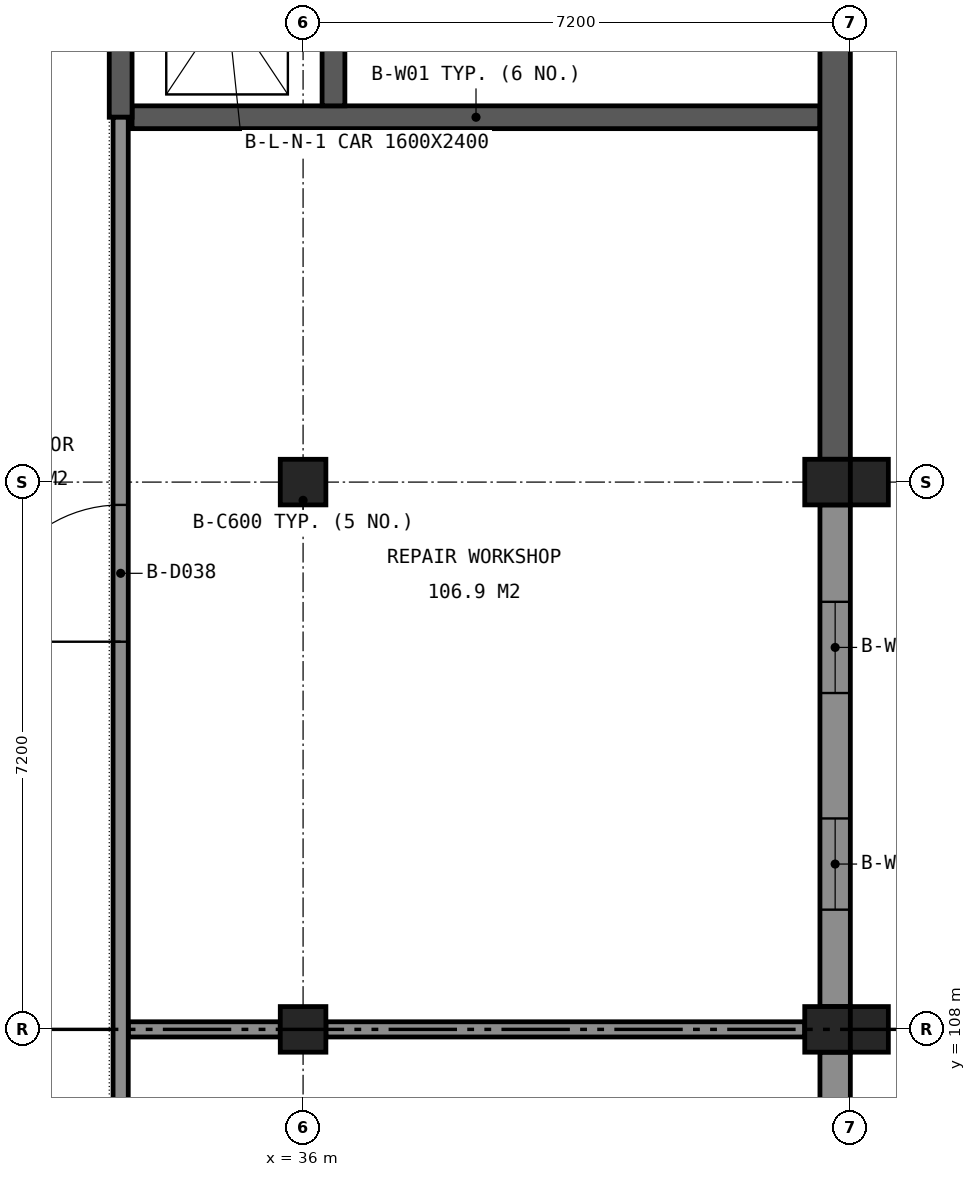
"""IFC4 building model, lengths in metres.
Left out: names, types, materials, properties, quantities, classifications, styles, units other than length and angle.
Written with IfcOpenShell. Run it as: python <this file> out.ifc"""

import sys

from ifc_helpers import new_model, si_unit, direction, frame, frame_2d, origin, origin_2d, place, context, subcontext, project, spatial, rectangle, extrude, element, fill, save


model = new_model("IFC4")
c1 = context("Model", 3, precision=1e-05, world=origin(), true_north=direction((0.0, 1.0)))
c2 = subcontext(c1, "Body", "Model", "MODEL_VIEW")
j1 = project(units=[si_unit("LENGTHUNIT", "METRE"), si_unit("PLANEANGLEUNIT", "RADIAN")], contexts=[c1])
p1 = place(None, origin())
s1 = spatial("IfcSite", under=j1, at=p1, CompositionType="ELEMENT")
p2 = place(p1, origin())
s2 = spatial("IfcBuilding", under=s1, at=p2, CompositionType="ELEMENT")
p3 = place(p2, frame((0.0, 0.0, 4.8)))
s3 = spatial("IfcBuildingStorey", under=s2, at=p3, CompositionType="ELEMENT", Elevation=4.8)
for number, where, z_axis, x_axis in (
    (1, (36.0, 115.2, 0.0), (0.0, 0.0, 1.0), (1.0, 0.0, 0.0)),
    (2, (36.0, 108.0, 0.0), (0.0, 0.0, 1.0), (1.0, 0.0, 0.0)),
    (3, (42.9, 115.2, 0.0), (0.0, 0.0, 1.0), (1.0, 0.0, 0.0)),
    (4, (42.9, 108.0, 0.0), (0.0, 0.0, 1.0), (1.0, 0.0, 0.0)),
):
    element("IfcColumn", number, at=place(p3, frame(where, z_axis=z_axis, x_axis=x_axis)), inside=s3, PredefinedType="COLUMN", context=c2, shape_type="SweptSolid", body=[
        extrude(rectangle(XDim=0.6, YDim=0.6, at=origin_2d()), origin(), (0.0, 0.0, 1.0), 4.8),
    ])
p4 = place(p3, frame((33.75, 120.0, 0.0), z_axis=(0.0, 0.0, 1.0), x_axis=(1.0, 0.0, 0.0)))
e5 = element("IfcWall", 5, at=p4, inside=s3, PredefinedType="SHEAR", context=c2, shape_type="SweptSolid", body=[
    extrude(rectangle(XDim=9.05, YDim=0.3, at=frame_2d((4.525, 0.0))), origin(), (0.0, 0.0, 1.0), 4.55),
])
p5 = place(p3, frame((33.6, 120.0, 0.0), z_axis=(0.0, 0.0, 1.0), x_axis=(0.0, 1.0, 0.0)))
e6 = element("IfcWall", 6, at=p5, inside=s3, PredefinedType="SHEAR", context=c2, shape_type="SweptSolid", body=[
    extrude(rectangle(XDim=9.2, YDim=0.3, at=frame_2d((4.6, 0.0))), origin(), (0.0, 0.0, 1.0), 4.55),
])
p6 = place(p5, frame((4.0, 0.0, 0.0)))
e7 = element("IfcOpeningElement", 7, at=p6, cuts=e6, PredefinedType="OPENING", context=c2, shape_type="SweptSolid", body=[
    extrude(rectangle(XDim=1.2, YDim=2.1, at=frame_2d((0.6, 1.05))), frame((0.0, 0.16, 0.0), z_axis=(0.0, -1.0, 0.0), x_axis=(1.0, 0.0, 0.0)), (0.0, 0.0, 1.0), 0.32),
])
p7 = place(p5, frame((7.45, 0.0, 0.0)))
e8 = element("IfcOpeningElement", 8, at=p7, cuts=e6, PredefinedType="OPENING", context=c2, shape_type="SweptSolid", body=[
    extrude(rectangle(XDim=0.9, YDim=2.1, at=frame_2d((0.45, 1.05))), frame((0.0, 0.16, 0.0), z_axis=(0.0, -1.0, 0.0), x_axis=(1.0, 0.0, 0.0)), (0.0, 0.0, 1.0), 0.32),
])
p8 = place(p3, frame((36.4, 120.15, 0.0), z_axis=(0.0, 0.0, 1.0), x_axis=(0.0, 1.0, 0.0)))
e9 = element("IfcWall", 9, at=p8, inside=s3, PredefinedType="SHEAR", context=c2, shape_type="SweptSolid", body=[
    extrude(rectangle(XDim=2.7, YDim=0.3, at=frame_2d((1.35, 0.0))), origin(), (0.0, 0.0, 1.0), 4.55),
])
p9 = place(p3, frame((43.0, 115.5, 0.0), z_axis=(0.0, 0.0, 1.0), x_axis=(0.0, 1.0, 0.0)))
e10 = element("IfcWall", 10, at=p9, inside=s3, PredefinedType="SHEAR", context=c2, shape_type="SweptSolid", body=[
    extrude(rectangle(XDim=14.1, YDim=0.4, at=frame_2d((7.05, 0.0))), origin(), (0.0, 0.0, 1.0), 4.55),
])
p10 = place(p9, frame((12.0, 0.0, 0.0)))
e11 = element("IfcOpeningElement", 11, at=p10, cuts=e10, PredefinedType="OPENING", context=c2, shape_type="SweptSolid", body=[
    extrude(rectangle(XDim=1.2, YDim=2.1, at=frame_2d((0.6, 1.05))), frame((0.0, 0.21, 0.0), z_axis=(0.0, -1.0, 0.0), x_axis=(1.0, 0.0, 0.0)), (0.0, 0.0, 1.0), 0.42),
])
p11 = place(p3, frame((43.0, 101.1, 0.0), z_axis=(0.0, 0.0, 1.0), x_axis=(0.0, 1.0, 0.0)))
e12 = element("IfcWall", 12, at=p11, inside=s3, PredefinedType="SOLIDWALL", context=c2, shape_type="SweptSolid", body=[
    extrude(rectangle(XDim=6.6, YDim=0.4, at=frame_2d((3.3, 0.0))), origin(), (0.0, 0.0, 1.0), 3.95),
])
p12 = place(p11, frame((0.975, 0.0, 0.9)))
e13 = element("IfcOpeningElement", 13, at=p12, cuts=e12, PredefinedType="OPENING", context=c2, shape_type="SweptSolid", body=[
    extrude(rectangle(XDim=1.2, YDim=2.4, at=frame_2d((0.6, 1.2))), frame((0.0, 0.21, 0.0), z_axis=(0.0, -1.0, 0.0), x_axis=(1.0, 0.0, 0.0)), (0.0, 0.0, 1.0), 0.42),
])
p13 = place(p11, frame((4.425, 0.0, 0.9)))
e14 = element("IfcOpeningElement", 14, at=p13, cuts=e12, PredefinedType="OPENING", context=c2, shape_type="SweptSolid", body=[
    extrude(rectangle(XDim=1.2, YDim=2.4, at=frame_2d((0.6, 1.2))), frame((0.0, 0.21, 0.0), z_axis=(0.0, -1.0, 0.0), x_axis=(1.0, 0.0, 0.0)), (0.0, 0.0, 1.0), 0.42),
])
p14 = place(p3, frame((43.0, 108.3, 0.0), z_axis=(0.0, 0.0, 1.0), x_axis=(0.0, 1.0, 0.0)))
e15 = element("IfcWall", 15, at=p14, inside=s3, PredefinedType="SOLIDWALL", context=c2, shape_type="SweptSolid", body=[
    extrude(rectangle(XDim=6.6, YDim=0.4, at=frame_2d((3.3, 0.0))), origin(), (0.0, 0.0, 1.0), 3.95),
])
p15 = place(p14, frame((1.275, 0.0, 0.9)))
e16 = element("IfcOpeningElement", 16, at=p15, cuts=e15, PredefinedType="OPENING", context=c2, shape_type="SweptSolid", body=[
    extrude(rectangle(XDim=1.2, YDim=2.4, at=frame_2d((0.6, 1.2))), frame((0.0, 0.21, 0.0), z_axis=(0.0, -1.0, 0.0), x_axis=(1.0, 0.0, 0.0)), (0.0, 0.0, 1.0), 0.42),
])
p16 = place(p14, frame((4.125, 0.0, 0.9)))
e17 = element("IfcOpeningElement", 17, at=p16, cuts=e15, PredefinedType="OPENING", context=c2, shape_type="SweptSolid", body=[
    extrude(rectangle(XDim=1.2, YDim=2.4, at=frame_2d((0.6, 1.2))), frame((0.0, 0.21, 0.0), z_axis=(0.0, -1.0, 0.0), x_axis=(1.0, 0.0, 0.0)), (0.0, 0.0, 1.0), 0.42),
])
for number, where, z_axis, x_axis in (
    (18, (43.45, 108.0, 0.0), (0.0, 0.0, 1.0), (1.0, 0.0, 0.0)),
    (19, (43.45, 115.2, 0.0), (0.0, 0.0, 1.0), (1.0, 0.0, 0.0)),
):
    element("IfcColumn", number, at=place(p3, frame(where, z_axis=z_axis, x_axis=x_axis)), inside=s3, PredefinedType="COLUMN", context=c2, shape_type="SweptSolid", body=[
        extrude(rectangle(XDim=0.5, YDim=0.6, at=origin_2d()), origin(), (0.0, 0.0, 1.0), 4.8),
    ])
p17 = place(p3, frame((33.7, 108.0, 0.0), z_axis=(0.0, 0.0, 1.0), x_axis=(1.0, 0.0, 0.0)))
e20 = element("IfcWall", 20, at=p17, inside=s3, PredefinedType="PARTITIONING", context=c2, shape_type="SweptSolid", body=[
    extrude(rectangle(XDim=2.0, YDim=0.2, at=frame_2d((1.0, 0.0))), origin(), (0.0, 0.0, 1.0), 3.95),
])
p18 = place(p3, frame((36.3, 108.0, 0.0), z_axis=(0.0, 0.0, 1.0), x_axis=(1.0, 0.0, 0.0)))
e21 = element("IfcWall", 21, at=p18, inside=s3, PredefinedType="PARTITIONING", context=c2, shape_type="SweptSolid", body=[
    extrude(rectangle(XDim=6.3, YDim=0.2, at=frame_2d((3.15, 0.0))), origin(), (0.0, 0.0, 1.0), 3.95),
])
p19 = place(p3, frame((33.6, 96.0, 0.0), z_axis=(0.0, 0.0, 1.0), x_axis=(0.0, 1.0, 0.0)))
e22 = element("IfcWall", 22, at=p19, inside=s3, PredefinedType="PARTITIONING", context=c2, shape_type="SweptSolid", body=[
    extrude(rectangle(XDim=24.0, YDim=0.2, at=frame_2d((12.0, 0.0))), origin(), (0.0, 0.0, 1.0), 3.95),
])
p20 = place(p19, frame((17.1, 0.0, 0.0)))
e23 = element("IfcOpeningElement", 23, at=p20, cuts=e22, PredefinedType="OPENING", context=c2, shape_type="SweptSolid", body=[
    extrude(rectangle(XDim=1.8, YDim=2.1, at=frame_2d((0.9, 1.05))), frame((0.0, 0.11, 0.0), z_axis=(0.0, -1.0, 0.0), x_axis=(1.0, 0.0, 0.0)), (0.0, 0.0, 1.0), 0.22),
])
p21 = place(p19, frame((9.7, 0.0, 0.0)))
e24 = element("IfcOpeningElement", 24, at=p21, cuts=e22, PredefinedType="OPENING", context=c2, shape_type="SweptSolid", body=[
    extrude(rectangle(XDim=1.0, YDim=2.1, at=frame_2d((0.5, 1.05))), frame((0.0, 0.11, 0.0), z_axis=(0.0, -1.0, 0.0), x_axis=(1.0, 0.0, 0.0)), (0.0, 0.0, 1.0), 0.22),
])
p22 = place(p19, frame((3.3, 0.0, 0.0)))
e25 = element("IfcOpeningElement", 25, at=p22, cuts=e22, PredefinedType="OPENING", context=c2, shape_type="SweptSolid", body=[
    extrude(rectangle(XDim=1.8, YDim=2.1, at=frame_2d((0.9, 1.05))), frame((0.0, 0.11, 0.0), z_axis=(0.0, -1.0, 0.0), x_axis=(1.0, 0.0, 0.0)), (0.0, 0.0, 1.0), 0.22),
])
p23 = place(p15, origin())
e26 = element("IfcWindow", 26, at=p23, inside=s3, PartitioningType="SINGLE_PANEL", PredefinedType="WINDOW", context=c2, shape_type="SweptSolid", body=[
    extrude(rectangle(XDim=1.2, YDim=2.4, at=frame_2d((0.6, 1.2))), frame((0.0, 0.03, 0.0), z_axis=(0.0, -1.0, 0.0), x_axis=(1.0, 0.0, 0.0)), (0.0, 0.0, 1.0), 0.06),
])
fill(e16, e26)
p24 = place(p16, origin())
e27 = element("IfcWindow", 27, at=p24, inside=s3, PartitioningType="SINGLE_PANEL", PredefinedType="WINDOW", context=c2, shape_type="SweptSolid", body=[
    extrude(rectangle(XDim=1.2, YDim=2.4, at=frame_2d((0.6, 1.2))), frame((0.0, 0.03, 0.0), z_axis=(0.0, -1.0, 0.0), x_axis=(1.0, 0.0, 0.0)), (0.0, 0.0, 1.0), 0.06),
])
fill(e17, e27)
p25 = place(p20, origin())
e28 = element("IfcDoor", 28, at=p25, inside=s3, OperationType="DOUBLE_DOOR_DOUBLE_SWING", PredefinedType="DOOR", context=c2, shape_type="SweptSolid", body=[
    extrude(rectangle(XDim=1.8, YDim=2.1, at=frame_2d((0.9, 1.05))), frame((0.0, 0.025, 0.0), z_axis=(0.0, -1.0, 0.0), x_axis=(1.0, 0.0, 0.0)), (0.0, 0.0, 1.0), 0.05),
])
fill(e23, e28)
save(model, sys.argv[1])
